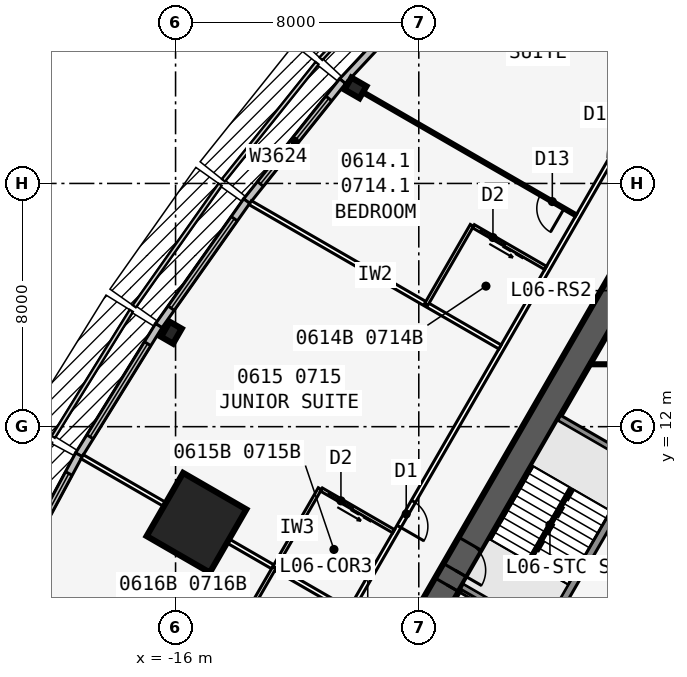
"""IFC4 building model, lengths in metres.
Left out: names, types, materials, properties, quantities, classifications, styles, units other than length and angle.
Written with IfcOpenShell. Run it as: python <this file> out.ifc"""

import sys

from ifc_helpers import new_model, si_unit, direction, frame, frame_2d, origin, origin_2d, place, context, subcontext, project, spatial, rectangle, i_section, extrude, element, fill, save


model = new_model("IFC4")
c1 = context("Model", 3, precision=1e-05, world=origin(), true_north=direction((0.0, 1.0)))
c2 = subcontext(c1, "Body", "Model", "MODEL_VIEW")
j1 = project(units=[si_unit("LENGTHUNIT", "METRE"), si_unit("PLANEANGLEUNIT", "RADIAN")], contexts=[c1])
p1 = place(None, origin())
s1 = spatial("IfcSite", under=j1, at=p1, CompositionType="ELEMENT")
p2 = place(p1, origin())
s2 = spatial("IfcBuilding", under=s1, at=p2, CompositionType="ELEMENT")
p3 = place(p2, frame((0.0, 0.0, 31.9)))
s3 = spatial("IfcBuildingStorey", under=s2, at=p3, CompositionType="ELEMENT", Elevation=31.9)
p4 = place(p3, frame((0.0, 19.052, 0.0), z_axis=(0.0, 0.0, 1.0), x_axis=(-0.499999749417, -0.866025548458, 0.0)))
e1 = element("IfcWall", 1, at=p4, inside=s3, PredefinedType="SHEAR", context=c2, shape_type="SweptSolid", body=[
    extrude(rectangle(XDim=33.0, YDim=0.9, at=frame_2d((16.5, 0.0))), origin(), (0.0, 0.0, 1.0), 3.4),
])
p5 = place(p4, frame((14.15, 0.0, 0.0)))
e2 = element("IfcOpeningElement", 2, at=p5, cuts=e1, PredefinedType="OPENING", context=c2, shape_type="SweptSolid", body=[
    extrude(rectangle(XDim=1.8, YDim=2.13, at=frame_2d((0.9, 1.065))), frame((0.0, 0.46, 0.0), z_axis=(0.0, -1.0, 0.0), x_axis=(1.0, 0.0, 0.0)), (0.0, 0.0, 1.0), 0.92),
])
p6 = place(p4, frame((12.6, 0.0, 0.0)))
e3 = element("IfcOpeningElement", 3, at=p6, cuts=e1, PredefinedType="OPENING", context=c2, shape_type="SweptSolid", body=[
    extrude(rectangle(XDim=1.0, YDim=2.13, at=frame_2d((0.5, 1.065))), frame((0.0, 0.46, 0.0), z_axis=(0.0, -1.0, 0.0), x_axis=(1.0, 0.0, 0.0)), (0.0, 0.0, 1.0), 0.92),
])
p7 = place(p3, frame((-0.062, 11.794, 0.0), z_axis=(0.0, 0.0, 1.0), x_axis=(-0.500006680225, -0.86602154692, 0.0)))
e4 = element("IfcWall", 4, at=p7, inside=s3, PredefinedType="SOLIDWALL", context=c2, shape_type="SweptSolid", body=[
    extrude(rectangle(XDim=7.733, YDim=0.25, at=frame_2d((3.866, 0.0))), origin(), (0.0, 0.0, 1.0), 3.235),
])
for number, where, z_axis, x_axis in (
    (5, (-0.679, 10.727, 0.0), (0.0, 0.0, 1.0), (-0.866, 0.5, 0.0)),
    (6, (-3.879, 5.184, 0.0), (0.0, 0.0, 1.0), (-0.866, 0.5, 0.0)),
):
    element("IfcWall", number, at=place(p3, frame(where, z_axis=z_axis, x_axis=x_axis)), inside=s3, PredefinedType="SOLIDWALL", context=c2, shape_type="SweptSolid", body=[
        extrude(rectangle(XDim=3.125, YDim=0.2, at=frame_2d((1.562, 0.0))), origin(), (0.0, 0.0, 1.0), 3.235),
    ])
for number, where, z_axis, x_axis in (
    (7, (-10.083, 23.142, 0.0), (0.0, 0.0, 1.0), (-0.5, -0.866, 0.0)),
    (8, (-16.137, 15.09, 0.0), (0.0, 0.0, 1.0), (-0.866, 0.5, 0.0)),
):
    element("IfcColumn", number, at=place(p3, frame(where, z_axis=z_axis, x_axis=x_axis)), inside=s3, PredefinedType="COLUMN", context=c2, shape_type="SweptSolid", body=[
        extrude(i_section(OverallWidth=0.455, OverallDepth=0.569, WebThickness=0.078, FlangeThickness=0.125, at=origin_2d()), origin(), (0.0, 0.0, 1.0), 3.4),
    ])
p8 = place(p3, frame((-15.312, 8.84, 0.0), z_axis=(0.0, 0.0, 1.0), x_axis=(-0.866025403784, 0.5, 0.0)))
e9 = element("IfcColumn", 9, at=p8, inside=s3, PredefinedType="COLUMN", context=c2, shape_type="SweptSolid", body=[
    extrude(rectangle(XDim=2.4, YDim=2.4, at=origin_2d()), origin(), (0.0, 0.0, 1.0), 3.4),
])
p9 = place(p3, frame((-4.909, 29.36, 0.0), z_axis=(0.0, 0.0, 1.0), x_axis=(-0.682289646561, -0.731081964075, 0.0)))
e10 = element("IfcWall", 10, at=p9, inside=s3, PredefinedType="STANDARD", context=c2, shape_type="SweptSolid", body=[
    extrude(rectangle(XDim=8.211, YDim=0.25, at=frame_2d((4.105, 0.0))), origin(), (0.0, 0.0, 1.0), 3.235),
])
p10 = place(p9, frame((2.006, 0.0, 0.45)))
e11 = element("IfcOpeningElement", 11, at=p10, cuts=e10, PredefinedType="OPENING", context=c2, shape_type="SweptSolid", body=[
    extrude(rectangle(XDim=4.2, YDim=2.4, at=frame_2d((2.1, 1.2))), frame((0.0, 0.135, 0.0), z_axis=(0.0, -1.0, 0.0), x_axis=(1.0, 0.0, 0.0)), (0.0, 0.0, 1.0), 0.27),
])
p11 = place(p3, frame((-10.505, 23.364, 0.0), z_axis=(0.0, 0.0, 1.0), x_axis=(-0.624594965756, -0.780948864364, 0.0)))
e12 = element("IfcWall", 12, at=p11, inside=s3, PredefinedType="STANDARD", context=c2, shape_type="SweptSolid", body=[
    extrude(rectangle(XDim=5.058, YDim=0.25, at=frame_2d((2.529, 0.0))), origin(), (0.0, 0.0, 1.0), 3.235),
])
p12 = place(p11, frame((0.729, 0.0, 0.45)))
e13 = element("IfcOpeningElement", 13, at=p12, cuts=e12, PredefinedType="OPENING", context=c2, shape_type="SweptSolid", body=[
    extrude(rectangle(XDim=3.6, YDim=2.4, at=frame_2d((1.8, 1.2))), frame((0.0, 0.135, 0.0), z_axis=(0.0, -1.0, 0.0), x_axis=(1.0, 0.0, 0.0)), (0.0, 0.0, 1.0), 0.27),
])
p13 = place(p3, frame((-13.659, 19.42, 0.0), z_axis=(0.0, 0.0, 1.0), x_axis=(-0.5766431066, -0.81699616132, 0.0)))
e14 = element("IfcWall", 14, at=p13, inside=s3, PredefinedType="STANDARD", context=c2, shape_type="SweptSolid", body=[
    extrude(rectangle(XDim=5.021, YDim=0.25, at=frame_2d((2.51, 0.0))), origin(), (0.0, 0.0, 1.0), 3.235),
])
p14 = place(p13, frame((0.71, 0.0, 0.45)))
e15 = element("IfcOpeningElement", 15, at=p14, cuts=e14, PredefinedType="OPENING", context=c2, shape_type="SweptSolid", body=[
    extrude(rectangle(XDim=3.6, YDim=2.4, at=frame_2d((1.8, 1.2))), frame((0.0, 0.135, 0.0), z_axis=(0.0, -1.0, 0.0), x_axis=(1.0, 0.0, 0.0)), (0.0, 0.0, 1.0), 0.27),
])
p15 = place(p3, frame((-16.551, 15.324, 0.0), z_axis=(0.0, 0.0, 1.0), x_axis=(-0.526132807704, -0.850402415717, 0.0)))
e16 = element("IfcWall", 16, at=p15, inside=s3, PredefinedType="STANDARD", context=c2, shape_type="SweptSolid", body=[
    extrude(rectangle(XDim=5.002, YDim=0.25, at=frame_2d((2.501, 0.0))), origin(), (0.0, 0.0, 1.0), 3.235),
])
p16 = place(p15, frame((0.701, 0.0, 0.45)))
e17 = element("IfcOpeningElement", 17, at=p16, cuts=e16, PredefinedType="OPENING", context=c2, shape_type="SweptSolid", body=[
    extrude(rectangle(XDim=3.6, YDim=2.4, at=frame_2d((1.8, 1.2))), frame((0.0, 0.135, 0.0), z_axis=(0.0, -1.0, 0.0), x_axis=(1.0, 0.0, 0.0)), (0.0, 0.0, 1.0), 0.27),
])
p17 = place(p3, frame((-19.178, 11.077, 0.0), z_axis=(0.0, 0.0, 1.0), x_axis=(-0.473412820489, -0.880840678782, 0.0)))
e18 = element("IfcWall", 18, at=p17, inside=s3, PredefinedType="STANDARD", context=c2, shape_type="SweptSolid", body=[
    extrude(rectangle(XDim=5.002, YDim=0.25, at=frame_2d((2.501, 0.0))), origin(), (0.0, 0.0, 1.0), 3.235),
])
p18 = place(p17, frame((0.701, 0.0, 0.45)))
e19 = element("IfcOpeningElement", 19, at=p18, cuts=e18, PredefinedType="OPENING", context=c2, shape_type="SweptSolid", body=[
    extrude(rectangle(XDim=3.6, YDim=2.4, at=frame_2d((1.8, 1.2))), frame((0.0, 0.135, 0.0), z_axis=(0.0, -1.0, 0.0), x_axis=(1.0, 0.0, 0.0)), (0.0, 0.0, 1.0), 0.27),
])
p19 = place(p3, frame((-0.5, 22.836, 0.0), z_axis=(0.0, 0.0, 1.0), x_axis=(-0.500001677587, -0.866024435227, 0.0)))
e20 = element("IfcWall", 20, at=p19, inside=s3, PredefinedType="PARTITIONING", context=c2, shape_type="SweptSolid", body=[
    extrude(rectangle(XDim=39.054, YDim=0.15, at=frame_2d((19.527, 0.0))), origin(), (0.0, 0.0, 1.0), 3.235),
])
p20 = place(p19, frame((1.558, 0.0, 0.0)))
e21 = element("IfcOpeningElement", 21, at=p20, cuts=e20, PredefinedType="OPENING", context=c2, shape_type="SweptSolid", body=[
    extrude(rectangle(XDim=0.95, YDim=2.13, at=frame_2d((0.475, 1.065))), frame((0.0, 0.085, 0.0), z_axis=(0.0, -1.0, 0.0), x_axis=(1.0, 0.0, 0.0)), (0.0, 0.0, 1.0), 0.17),
])
p21 = place(p19, frame((15.352, 0.0, 0.0)))
e22 = element("IfcOpeningElement", 22, at=p21, cuts=e20, PredefinedType="OPENING", context=c2, shape_type="SweptSolid", body=[
    extrude(rectangle(XDim=0.95, YDim=2.13, at=frame_2d((0.475, 1.065))), frame((0.0, 0.085, 0.0), z_axis=(0.0, -1.0, 0.0), x_axis=(1.0, 0.0, 0.0)), (0.0, 0.0, 1.0), 0.17),
])
p22 = place(p19, frame((22.752, 0.0, 0.0)))
e23 = element("IfcOpeningElement", 23, at=p22, cuts=e20, PredefinedType="OPENING", context=c2, shape_type="SweptSolid", body=[
    extrude(rectangle(XDim=0.95, YDim=2.13, at=frame_2d((0.475, 1.065))), frame((0.0, 0.085, 0.0), z_axis=(0.0, -1.0, 0.0), x_axis=(1.0, 0.0, 0.0)), (0.0, 0.0, 1.0), 0.17),
])
p23 = place(p19, frame((30.952, 0.0, 0.0)))
e24 = element("IfcOpeningElement", 24, at=p23, cuts=e20, PredefinedType="OPENING", context=c2, shape_type="SweptSolid", body=[
    extrude(rectangle(XDim=0.95, YDim=2.13, at=frame_2d((0.475, 1.065))), frame((0.0, 0.085, 0.0), z_axis=(0.0, -1.0, 0.0), x_axis=(1.0, 0.0, 0.0)), (0.0, 0.0, 1.0), 0.17),
])
p24 = place(p19, frame((37.752, 0.0, 0.0)))
e25 = element("IfcOpeningElement", 25, at=p24, cuts=e20, PredefinedType="OPENING", context=c2, shape_type="SweptSolid", body=[
    extrude(rectangle(XDim=0.95, YDim=2.13, at=frame_2d((0.475, 1.065))), frame((0.0, 0.085, 0.0), z_axis=(0.0, -1.0, 0.0), x_axis=(1.0, 0.0, 0.0)), (0.0, 0.0, 1.0), 0.17),
])
p25 = place(p3, frame((-2.829, 18.954, 0.0), z_axis=(0.0, 0.0, 1.0), x_axis=(-0.866020536561, 0.500008430184, 0.0)))
e26 = element("IfcWall", 26, at=p25, inside=s3, PredefinedType="PARTITIONING", context=c2, shape_type="SweptSolid", body=[
    extrude(rectangle(XDim=8.72, YDim=0.1, at=frame_2d((4.36, 0.0))), origin(), (0.0, 0.0, 1.0), 2.389),
])
p26 = place(p25, frame((0.45, 0.0, 0.0)))
e27 = element("IfcOpeningElement", 27, at=p26, cuts=e26, PredefinedType="OPENING", context=c2, shape_type="SweptSolid", body=[
    extrude(rectangle(XDim=0.9, YDim=2.13, at=frame_2d((0.45, 1.065))), frame((0.0, 0.06, 0.0), z_axis=(0.0, -1.0, 0.0), x_axis=(1.0, 0.0, 0.0)), (0.0, 0.0, 1.0), 0.12),
])
p27 = place(p3, frame((-5.329, 14.623, 0.0), z_axis=(0.0, 0.0, 1.0), x_axis=(-0.866018409083, 0.500012114982, 0.0)))
e28 = element("IfcWall", 28, at=p27, inside=s3, PredefinedType="PARTITIONING", context=c2, shape_type="SweptSolid", body=[
    extrude(rectangle(XDim=9.485, YDim=0.15, at=frame_2d((4.742, 0.0))), origin(), (0.0, 0.0, 1.0), 2.389),
])
p28 = place(p3, frame((-10.329, 5.963, 0.0), z_axis=(0.0, 0.0, 1.0), x_axis=(-0.866021688545, 0.500006434927, 0.0)))
e29 = element("IfcWall", 29, at=p28, inside=s3, PredefinedType="PARTITIONING", context=c2, shape_type="SweptSolid", body=[
    extrude(rectangle(XDim=10.096, YDim=0.15, at=frame_2d((5.048, 0.0))), origin(), (0.0, 0.0, 1.0), 2.389),
])
p29 = place(p3, frame((-6.253, 18.622, 0.0), z_axis=(0.0, 0.0, 1.0), x_axis=(-0.499990139034, -0.866031096941, 0.0)))
e30 = element("IfcWall", 30, at=p29, inside=s3, PredefinedType="PLUMBINGWALL", context=c2, shape_type="SweptSolid", body=[
    extrude(rectangle(XDim=3.0, YDim=0.12, at=frame_2d((1.5, 0.0))), origin(), (0.0, 0.0, 1.0), 3.235),
])
p30 = place(p3, frame((-3.829, 17.221, 0.0), z_axis=(0.0, 0.0, 1.0), x_axis=(-0.865997131366, 0.500048966069, 0.0)))
e31 = element("IfcWall", 31, at=p30, inside=s3, PredefinedType="PLUMBINGWALL", context=c2, shape_type="SweptSolid", body=[
    extrude(rectangle(XDim=2.74, YDim=0.12, at=frame_2d((1.37, 0.0))), origin(), (0.0, 0.0, 1.0), 3.235),
])
p31 = place(p30, frame((1.55, 0.0, 0.0)))
e32 = element("IfcOpeningElement", 32, at=p31, cuts=e31, PredefinedType="OPENING", context=c2, shape_type="SweptSolid", body=[
    extrude(rectangle(XDim=0.9, YDim=2.13, at=frame_2d((0.45, 1.065))), frame((0.0, 0.07, 0.0), z_axis=(0.0, -1.0, 0.0), x_axis=(1.0, 0.0, 0.0)), (0.0, 0.0, 1.0), 0.14),
])
p32 = place(p3, frame((-11.253, 9.961, 0.0), z_axis=(0.0, 0.0, 1.0), x_axis=(-0.499990139034, -0.866031096941, 0.0)))
e33 = element("IfcWall", 33, at=p32, inside=s3, PredefinedType="PLUMBINGWALL", context=c2, shape_type="SweptSolid", body=[
    extrude(rectangle(XDim=3.0, YDim=0.12, at=frame_2d((1.5, 0.0))), origin(), (0.0, 0.0, 1.0), 3.235),
])
p33 = place(p3, frame((-8.829, 8.561, 0.0), z_axis=(0.0, 0.0, 1.0), x_axis=(-0.866035715982, 0.499982138324, 0.0)))
e34 = element("IfcWall", 34, at=p33, inside=s3, PredefinedType="PLUMBINGWALL", context=c2, shape_type="SweptSolid", body=[
    extrude(rectangle(XDim=2.74, YDim=0.12, at=frame_2d((1.37, 0.0))), origin(), (0.0, 0.0, 1.0), 3.235),
])
p34 = place(p33, frame((1.55, 0.0, 0.0)))
e35 = element("IfcOpeningElement", 35, at=p34, cuts=e34, PredefinedType="OPENING", context=c2, shape_type="SweptSolid", body=[
    extrude(rectangle(XDim=0.9, YDim=2.13, at=frame_2d((0.45, 1.065))), frame((0.0, 0.07, 0.0), z_axis=(0.0, -1.0, 0.0), x_axis=(1.0, 0.0, 0.0)), (0.0, 0.0, 1.0), 0.14),
])
p35 = place(p3, frame((-12.753, 7.363, 0.0), z_axis=(0.0, 0.0, 1.0), x_axis=(-0.50002537861, -0.866010750942, 0.0)))
e36 = element("IfcWall", 36, at=p35, inside=s3, PredefinedType="PLUMBINGWALL", context=c2, shape_type="SweptSolid", body=[
    extrude(rectangle(XDim=3.0, YDim=0.12, at=frame_2d((1.5, 0.0))), origin(), (0.0, 0.0, 1.0), 3.235),
])
p36 = place(p3, frame((-2.367, 14.052, 0.0), z_axis=(0.0, 0.0, 1.0), x_axis=(1.0, 0.0, 0.0)))
e37 = element("IfcWall", 37, at=p36, inside=s3, PredefinedType="PARTITIONING", context=c2, shape_type="SweptSolid", body=[
    extrude(rectangle(XDim=4.734, YDim=0.1, at=frame_2d((2.367, 0.0))), origin(), (0.0, 0.0, 1.0), 3.235),
])
p37 = place(p36, frame((1.917, 0.0, 0.0)))
e38 = element("IfcOpeningElement", 38, at=p37, cuts=e37, PredefinedType="OPENING", context=c2, shape_type="SweptSolid", body=[
    extrude(rectangle(XDim=0.9, YDim=2.13, at=frame_2d((0.45, 1.065))), frame((0.0, 0.06, 0.0), z_axis=(0.0, -1.0, 0.0), x_axis=(1.0, 0.0, 0.0)), (0.0, 0.0, 1.0), 0.12),
])
p38 = place(p3, frame((-2.988, 9.978, 0.0), z_axis=(0.0, 0.0, 1.0), x_axis=(-0.499992232847, -0.866029888106, 0.0)))
e39 = element("IfcWall", 39, at=p38, inside=s3, PredefinedType="SOLIDWALL", context=c2, shape_type="SweptSolid", body=[
    extrude(rectangle(XDim=2.794, YDim=0.1, at=frame_2d((1.397, 0.0))), origin(), (0.0, 0.0, 1.0), 3.4),
])
p39 = place(p12, origin())
e40 = element("IfcWindow", 40, at=p39, inside=s3, PartitioningType="SINGLE_PANEL", PredefinedType="WINDOW", context=c2, shape_type="SweptSolid", body=[
    extrude(rectangle(XDim=3.6, YDim=2.4, at=frame_2d((1.8, 1.2))), frame((0.0, 0.03, 0.0), z_axis=(0.0, -1.0, 0.0), x_axis=(1.0, 0.0, 0.0)), (0.0, 0.0, 1.0), 0.06),
])
fill(e13, e40)
p40 = place(p14, origin())
e41 = element("IfcWindow", 41, at=p40, inside=s3, PartitioningType="SINGLE_PANEL", PredefinedType="WINDOW", context=c2, shape_type="SweptSolid", body=[
    extrude(rectangle(XDim=3.6, YDim=2.4, at=frame_2d((1.8, 1.2))), frame((0.0, 0.03, 0.0), z_axis=(0.0, -1.0, 0.0), x_axis=(1.0, 0.0, 0.0)), (0.0, 0.0, 1.0), 0.06),
])
fill(e15, e41)
p41 = place(p16, origin())
e42 = element("IfcWindow", 42, at=p41, inside=s3, PartitioningType="SINGLE_PANEL", PredefinedType="WINDOW", context=c2, shape_type="SweptSolid", body=[
    extrude(rectangle(XDim=3.6, YDim=2.4, at=frame_2d((1.8, 1.2))), frame((0.0, 0.03, 0.0), z_axis=(0.0, -1.0, 0.0), x_axis=(1.0, 0.0, 0.0)), (0.0, 0.0, 1.0), 0.06),
])
fill(e17, e42)
p42 = place(p18, origin())
e43 = element("IfcWindow", 43, at=p42, inside=s3, PartitioningType="SINGLE_PANEL", PredefinedType="WINDOW", context=c2, shape_type="SweptSolid", body=[
    extrude(rectangle(XDim=3.6, YDim=2.4, at=frame_2d((1.8, 1.2))), frame((0.0, 0.03, 0.0), z_axis=(0.0, -1.0, 0.0), x_axis=(1.0, 0.0, 0.0)), (0.0, 0.0, 1.0), 0.06),
])
fill(e19, e43)
p43 = place(p26, origin())
e44 = element("IfcDoor", 44, at=p43, inside=s3, OperationType="SINGLE_SWING_LEFT", PredefinedType="DOOR", context=c2, shape_type="SweptSolid", body=[
    extrude(rectangle(XDim=0.9, YDim=2.13, at=frame_2d((0.45, 1.065))), frame((0.0, 0.025, 0.0), z_axis=(0.0, -1.0, 0.0), x_axis=(1.0, 0.0, 0.0)), (0.0, 0.0, 1.0), 0.05),
])
fill(e27, e44)
p44 = place(p31, origin())
e45 = element("IfcDoor", 45, at=p44, inside=s3, OperationType="SLIDING_TO_LEFT", PredefinedType="DOOR", context=c2, shape_type="SweptSolid", body=[
    extrude(rectangle(XDim=0.9, YDim=2.13, at=frame_2d((0.45, 1.065))), frame((0.0, 0.025, 0.0), z_axis=(0.0, -1.0, 0.0), x_axis=(1.0, 0.0, 0.0)), (0.0, 0.0, 1.0), 0.05),
])
fill(e32, e45)
p45 = place(p34, origin())
e46 = element("IfcDoor", 46, at=p45, inside=s3, OperationType="SLIDING_TO_LEFT", PredefinedType="DOOR", context=c2, shape_type="SweptSolid", body=[
    extrude(rectangle(XDim=0.9, YDim=2.13, at=frame_2d((0.45, 1.065))), frame((0.0, 0.025, 0.0), z_axis=(0.0, -1.0, 0.0), x_axis=(1.0, 0.0, 0.0)), (0.0, 0.0, 1.0), 0.05),
])
fill(e35, e46)
p46 = place(p21, origin())
e47 = element("IfcDoor", 47, at=p46, inside=s3, OperationType="SINGLE_SWING_RIGHT", PredefinedType="DOOR", context=c2, shape_type="SweptSolid", body=[
    extrude(rectangle(XDim=0.95, YDim=2.13, at=frame_2d((0.475, 1.065))), frame((0.0, 0.025, 0.0), z_axis=(0.0, -1.0, 0.0), x_axis=(1.0, 0.0, 0.0)), (0.0, 0.0, 1.0), 0.05),
])
fill(e22, e47)
p47 = place(p5, origin())
e48 = element("IfcDoor", 48, at=p47, inside=s3, OperationType="DOUBLE_DOOR_SINGLE_SWING", PredefinedType="DOOR", context=c2, shape_type="SweptSolid", body=[
    extrude(rectangle(XDim=1.8, YDim=2.13, at=frame_2d((0.9, 1.065))), frame((0.0, 0.025, 0.0), z_axis=(0.0, -1.0, 0.0), x_axis=(1.0, 0.0, 0.0)), (0.0, 0.0, 1.0), 0.05),
])
fill(e2, e48)
p48 = place(p6, origin())
e49 = element("IfcDoor", 49, at=p48, inside=s3, OperationType="SINGLE_SWING_RIGHT", PredefinedType="DOOR", context=c2, shape_type="SweptSolid", body=[
    extrude(rectangle(XDim=1.0, YDim=2.13, at=frame_2d((0.5, 1.065))), frame((0.0, 0.025, 0.0), z_axis=(0.0, -1.0, 0.0), x_axis=(1.0, 0.0, 0.0)), (0.0, 0.0, 1.0), 0.05),
])
fill(e3, e49)
save(model, sys.argv[1])
